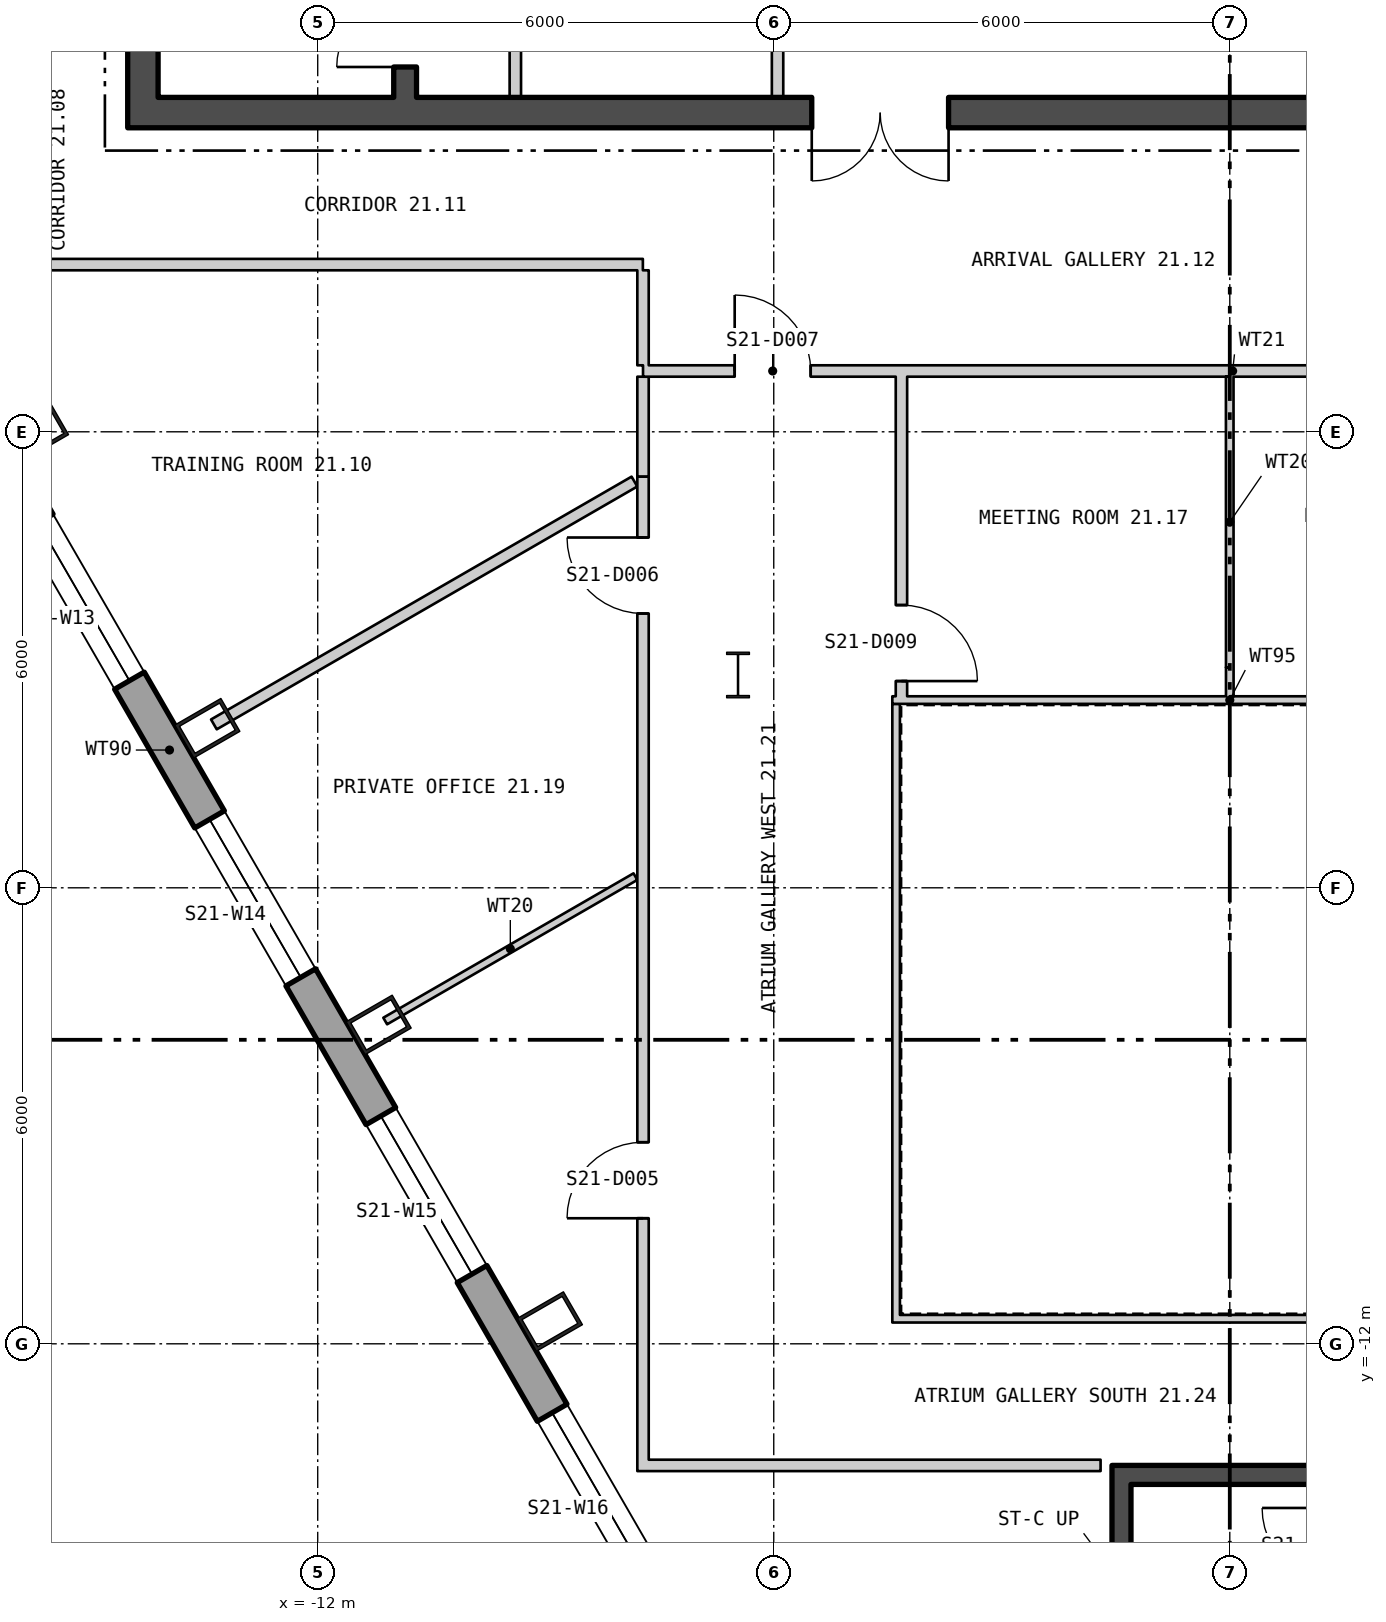
"""IFC4 building model, lengths in metres.
Left out: names, types, materials, properties, quantities, classifications, styles, units other than length and angle.
Written with IfcOpenShell. Run it as: python <this file> out.ifc"""

import sys

from ifc_helpers import new_model, si_unit, direction, frame, frame_2d, origin, origin_2d, place, context, subcontext, project, spatial, polyline, rectangle, hollow_rectangle, i_section, outline, extrude, element, fill, save


model = new_model("IFC4")
c1 = context("Model", 3, precision=1e-05, world=origin(), true_north=direction((0.0, 1.0)))
c2 = subcontext(c1, "Body", "Model", "MODEL_VIEW")
j1 = project(units=[si_unit("LENGTHUNIT", "METRE"), si_unit("PLANEANGLEUNIT", "RADIAN")], contexts=[c1])
p1 = place(None, origin())
s1 = spatial("IfcSite", under=j1, at=p1, CompositionType="ELEMENT")
p2 = place(p1, origin())
s2 = spatial("IfcBuilding", under=s1, at=p2, CompositionType="ELEMENT")
p3 = place(p2, frame((0.0, 0.0, 280.5)))
s3 = spatial("IfcBuildingStorey", under=s2, at=p3, CompositionType="ELEMENT", Elevation=280.5)
for number, where, z_axis, x_axis in (
    (1, (-15.706, 0.004, 0.0), (0.0, 0.0, 1.0), (0.5, -0.866, 0.0)),
    (2, (-13.452, -3.9, 0.0), (0.0, 0.0, 1.0), (0.5, -0.866, 0.0)),
    (3, (-11.198, -7.804, 0.0), (0.0, 0.0, 1.0), (0.5, -0.866, 0.0)),
    (4, (-8.945, -11.707, 0.0), (0.0, 0.0, 1.0), (0.5, -0.866, 0.0)),
):
    element("IfcColumn", number, at=place(p3, frame(where, z_axis=z_axis, x_axis=x_axis)), inside=s3, PredefinedType="COLUMN", context=c2, shape_type="SweptSolid", body=[
        extrude(hollow_rectangle(XDim=0.5, YDim=0.7, WallThickness=0.045, at=origin_2d()), origin(), (0.0, 0.0, 1.0), 3.9),
    ])
p4 = place(p3, frame((-6.47, -3.2, 0.0), z_axis=(0.0, 0.0, 1.0), x_axis=(1.0, 0.0, 0.0)))
e5 = element("IfcColumn", 5, at=p4, inside=s3, PredefinedType="COLUMN", context=c2, shape_type="SweptSolid", body=[
    extrude(i_section(OverallWidth=0.3, OverallDepth=0.6, WebThickness=0.015, FlangeThickness=0.03, at=origin_2d()), origin(), (0.0, 0.0, 1.0), 3.9),
])
p5 = place(p3, frame((-25.385, 15.619, -0.18), z_axis=(0.0, 0.0, 1.0), x_axis=(0.500000711659, -0.866024992908, 0.0)))
e6 = element("IfcWall", 6, at=p5, inside=s3, PredefinedType="SOLIDWALL", context=c2, shape_type="SweptSolid", body=[
    extrude(outline(polyline([(-0.13, -0.225), (45.87, -0.225), (45.61, 0.225), (0.13, 0.225), (-0.13, -0.225)])), origin(), (0.0, 0.0, 1.0), 3.68),
])
p6 = place(p5, frame((1.424, 0.0, 1.08)))
e7 = element("IfcOpeningElement", 7, at=p6, cuts=e6, PredefinedType="OPENING", context=c2, shape_type="SweptSolid", body=[
    extrude(rectangle(XDim=2.4, YDim=2.0, at=frame_2d((1.2, 1.0))), frame((0.0, 0.235, 0.0), z_axis=(0.0, -1.0, 0.0), x_axis=(1.0, 0.0, 0.0)), (0.0, 0.0, 1.0), 0.47),
])
p7 = place(p5, frame((5.893, 0.0, 1.08)))
e8 = element("IfcOpeningElement", 8, at=p7, cuts=e6, PredefinedType="OPENING", context=c2, shape_type="SweptSolid", body=[
    extrude(rectangle(XDim=2.4, YDim=2.0, at=frame_2d((1.2, 1.0))), frame((0.0, 0.235, 0.0), z_axis=(0.0, -1.0, 0.0), x_axis=(1.0, 0.0, 0.0)), (0.0, 0.0, 1.0), 0.47),
])
p8 = place(p5, frame((10.401, 0.0, 1.08)))
e9 = element("IfcOpeningElement", 9, at=p8, cuts=e6, PredefinedType="OPENING", context=c2, shape_type="SweptSolid", body=[
    extrude(rectangle(XDim=2.4, YDim=2.0, at=frame_2d((1.2, 1.0))), frame((0.0, 0.235, 0.0), z_axis=(0.0, -1.0, 0.0), x_axis=(1.0, 0.0, 0.0)), (0.0, 0.0, 1.0), 0.47),
])
p9 = place(p5, frame((14.909, 0.0, 1.08)))
e10 = element("IfcOpeningElement", 10, at=p9, cuts=e6, PredefinedType="OPENING", context=c2, shape_type="SweptSolid", body=[
    extrude(rectangle(XDim=2.4, YDim=2.0, at=frame_2d((1.2, 1.0))), frame((0.0, 0.235, 0.0), z_axis=(0.0, -1.0, 0.0), x_axis=(1.0, 0.0, 0.0)), (0.0, 0.0, 1.0), 0.47),
])
p10 = place(p5, frame((19.416, 0.0, 1.08)))
e11 = element("IfcOpeningElement", 11, at=p10, cuts=e6, PredefinedType="OPENING", context=c2, shape_type="SweptSolid", body=[
    extrude(rectangle(XDim=2.4, YDim=2.0, at=frame_2d((1.2, 1.0))), frame((0.0, 0.235, 0.0), z_axis=(0.0, -1.0, 0.0), x_axis=(1.0, 0.0, 0.0)), (0.0, 0.0, 1.0), 0.47),
])
p11 = place(p5, frame((23.924, 0.0, 1.08)))
e12 = element("IfcOpeningElement", 12, at=p11, cuts=e6, PredefinedType="OPENING", context=c2, shape_type="SweptSolid", body=[
    extrude(rectangle(XDim=2.4, YDim=2.0, at=frame_2d((1.2, 1.0))), frame((0.0, 0.235, 0.0), z_axis=(0.0, -1.0, 0.0), x_axis=(1.0, 0.0, 0.0)), (0.0, 0.0, 1.0), 0.47),
])
p12 = place(p5, frame((28.431, 0.0, 1.08)))
e13 = element("IfcOpeningElement", 13, at=p12, cuts=e6, PredefinedType="OPENING", context=c2, shape_type="SweptSolid", body=[
    extrude(rectangle(XDim=2.4, YDim=2.0, at=frame_2d((1.2, 1.0))), frame((0.0, 0.235, 0.0), z_axis=(0.0, -1.0, 0.0), x_axis=(1.0, 0.0, 0.0)), (0.0, 0.0, 1.0), 0.47),
])
p13 = place(p5, frame((32.939, 0.0, 1.08)))
e14 = element("IfcOpeningElement", 14, at=p13, cuts=e6, PredefinedType="OPENING", context=c2, shape_type="SweptSolid", body=[
    extrude(rectangle(XDim=2.4, YDim=2.0, at=frame_2d((1.2, 1.0))), frame((0.0, 0.235, 0.0), z_axis=(0.0, -1.0, 0.0), x_axis=(1.0, 0.0, 0.0)), (0.0, 0.0, 1.0), 0.47),
])
p14 = place(p5, frame((37.447, 0.0, 1.08)))
e15 = element("IfcOpeningElement", 15, at=p14, cuts=e6, PredefinedType="OPENING", context=c2, shape_type="SweptSolid", body=[
    extrude(rectangle(XDim=2.4, YDim=2.0, at=frame_2d((1.2, 1.0))), frame((0.0, 0.235, 0.0), z_axis=(0.0, -1.0, 0.0), x_axis=(1.0, 0.0, 0.0)), (0.0, 0.0, 1.0), 0.47),
])
p15 = place(p5, frame((41.916, 0.0, 1.08)))
e16 = element("IfcOpeningElement", 16, at=p15, cuts=e6, PredefinedType="OPENING", context=c2, shape_type="SweptSolid", body=[
    extrude(rectangle(XDim=2.4, YDim=2.0, at=frame_2d((1.2, 1.0))), frame((0.0, 0.235, 0.0), z_axis=(0.0, -1.0, 0.0), x_axis=(1.0, 0.0, 0.0)), (0.0, 0.0, 1.0), 0.47),
])
for number, where, z_axis, x_axis in (
    (17, (-4.44, -11.67, 0.0), (0.0, 0.0, 1.0), (1.0, 0.0, 0.0)),
    (18, (4.44, -3.53, 0.0), (0.0, 0.0, 1.0), (-1.0, 0.0, 0.0)),
):
    element("IfcWall", number, at=place(p3, frame(where, z_axis=z_axis, x_axis=x_axis)), inside=s3, PredefinedType="PARTITIONING", context=c2, shape_type="SweptSolid", body=[
        extrude(rectangle(XDim=8.88, YDim=0.1, at=frame_2d((4.44, 0.0))), origin(), (0.0, 0.0, 1.0), 3.7),
    ])
p16 = place(p3, frame((-4.39, -3.58, 0.0), z_axis=(0.0, 0.0, 1.0), x_axis=(0.0, -1.0, 0.0)))
e19 = element("IfcWall", 19, at=p16, inside=s3, PredefinedType="PARTITIONING", context=c2, shape_type="SweptSolid", body=[
    extrude(rectangle(XDim=8.04, YDim=0.1, at=frame_2d((4.02, 0.0))), origin(), (0.0, 0.0, 1.0), 3.7),
])
p17 = place(p3, frame((-14.5, 4.2, 0.0), z_axis=(0.0, 0.0, 1.0), x_axis=(1.0, 0.0, 0.0)))
e20 = element("IfcWall", 20, at=p17, inside=s3, PredefinedType="SHEAR", context=c2, shape_type="SweptSolid", body=[
    extrude(rectangle(XDim=29.0, YDim=0.4, at=frame_2d((14.5, 0.0))), origin(), (0.0, 0.0, 1.0), 3.7),
])
p18 = place(p17, frame((9.0, 0.0, 0.0)))
e21 = element("IfcOpeningElement", 21, at=p18, cuts=e20, PredefinedType="OPENING", context=c2, shape_type="SweptSolid", body=[
    extrude(rectangle(XDim=1.8, YDim=2.4, at=frame_2d((0.9, 1.2))), frame((0.0, 0.21, 0.0), z_axis=(0.0, -1.0, 0.0), x_axis=(1.0, 0.0, 0.0)), (0.0, 0.0, 1.0), 0.42),
])
p19 = place(p17, frame((19.0, 0.0, 0.0)))
e22 = element("IfcOpeningElement", 22, at=p19, cuts=e20, PredefinedType="OPENING", context=c2, shape_type="SweptSolid", body=[
    extrude(rectangle(XDim=1.8, YDim=2.4, at=frame_2d((0.9, 1.2))), frame((0.0, 0.21, 0.0), z_axis=(0.0, -1.0, 0.0), x_axis=(1.0, 0.0, 0.0)), (0.0, 0.0, 1.0), 0.42),
])
p20 = place(p3, frame((-14.3, 4.4, 0.0), z_axis=(0.0, 0.0, 1.0), x_axis=(0.0, 1.0, 0.0)))
e23 = element("IfcWall", 23, at=p20, inside=s3, PredefinedType="SHEAR", context=c2, shape_type="SweptSolid", body=[
    extrude(rectangle(XDim=13.2, YDim=0.4, at=frame_2d((6.6, 0.0))), origin(), (0.0, 0.0, 1.0), 3.7),
])
p21 = place(p20, frame((3.05, 0.0, 0.0)))
e24 = element("IfcOpeningElement", 24, at=p21, cuts=e23, PredefinedType="OPENING", context=c2, shape_type="SweptSolid", body=[
    extrude(rectangle(XDim=1.5, YDim=2.1, at=frame_2d((0.75, 1.05))), frame((0.0, 0.21, 0.0), z_axis=(0.0, -1.0, 0.0), x_axis=(1.0, 0.0, 0.0)), (0.0, 0.0, 1.0), 0.42),
])
p22 = place(p3, frame((-10.85, 4.4, 0.0), z_axis=(0.0, 0.0, 1.0), x_axis=(0.0, 1.0, 0.0)))
e25 = element("IfcWall", 25, at=p22, inside=s3, PredefinedType="SHEAR", context=c2, shape_type="SweptSolid", body=[
    extrude(rectangle(XDim=13.2, YDim=0.3, at=frame_2d((6.6, 0.0))), origin(), (0.0, 0.0, 1.0), 3.7),
])
p23 = place(p22, frame((1.575, 0.0, 0.0)))
e26 = element("IfcOpeningElement", 26, at=p23, cuts=e25, PredefinedType="OPENING", context=c2, shape_type="SweptSolid", body=[
    extrude(rectangle(XDim=1.25, YDim=2.1, at=frame_2d((0.625, 1.05))), frame((0.0, 0.16, 0.0), z_axis=(0.0, -1.0, 0.0), x_axis=(1.0, 0.0, 0.0)), (0.0, 0.0, 1.0), 0.32),
])
p24 = place(p22, frame((0.4, 0.0, 0.0)))
e27 = element("IfcOpeningElement", 27, at=p24, cuts=e25, PredefinedType="OPENING", context=c2, shape_type="SweptSolid", body=[
    extrude(rectangle(XDim=0.9, YDim=2.1, at=frame_2d((0.45, 1.05))), frame((0.0, 0.16, 0.0), z_axis=(0.0, -1.0, 0.0), x_axis=(1.0, 0.0, 0.0)), (0.0, 0.0, 1.0), 0.32),
])
for number, where, z_axis, x_axis in (
    (28, (-9.4, 4.4, 0.0), (0.0, 0.0, 1.0), (0.0, 1.0, 0.0)),
    (29, (-5.95, 4.4, 0.0), (0.0, 0.0, 1.0), (0.0, 1.0, 0.0)),
):
    element("IfcWall", number, at=place(p3, frame(where, z_axis=z_axis, x_axis=x_axis)), inside=s3, PredefinedType="PARTITIONING", context=c2, shape_type="SweptSolid", body=[
        extrude(rectangle(XDim=1.895, YDim=0.15, at=frame_2d((0.948, 0.0))), origin(), (0.0, 0.0, 1.0), 3.7),
    ])
p25 = place(p3, frame((-1.425, -21.05, 0.0), z_axis=(0.0, 0.0, 1.0), x_axis=(0.0, 1.0, 0.0)))
e30 = element("IfcWall", 30, at=p25, inside=s3, PredefinedType="SHEAR", context=c2, shape_type="SweptSolid", body=[
    extrude(rectangle(XDim=7.2, YDim=0.25, at=frame_2d((3.6, 0.0))), origin(), (0.0, 0.0, 1.0), 3.7),
])
p26 = place(p3, frame((-1.55, -13.725, 0.0), z_axis=(0.0, 0.0, 1.0), x_axis=(1.0, 0.0, 0.0)))
e31 = element("IfcWall", 31, at=p26, inside=s3, PredefinedType="SHEAR", context=c2, shape_type="SweptSolid", body=[
    extrude(rectangle(XDim=3.1, YDim=0.25, at=frame_2d((1.55, 0.0))), origin(), (0.0, 0.0, 1.0), 3.7),
])
p27 = place(p3, frame((-16.225, 2.2, 0.0), z_axis=(0.0, 0.0, 1.0), x_axis=(1.0, 0.0, 0.0)))
e32 = element("IfcWall", 32, at=p27, inside=s3, PredefinedType="PARTITIONING", context=c2, shape_type="SweptSolid", body=[
    extrude(rectangle(XDim=8.503, YDim=0.15, at=frame_2d((4.252, 0.0))), origin(), (0.0, 0.0, 1.0), 3.7),
])
p28 = place(p3, frame((-13.366, -3.85, 0.0), z_axis=(0.0, 0.0, 1.0), x_axis=(0.865990094875, 0.500061151839, 0.0)))
e33 = element("IfcWall", 33, at=p28, inside=s3, PredefinedType="PARTITIONING", context=c2, shape_type="SweptSolid", body=[
    extrude(rectangle(XDim=6.389, YDim=0.15, at=frame_2d((3.195, 0.0))), origin(), (0.0, 0.0, 1.0), 3.7),
])
p29 = place(p3, frame((-11.112, -7.753, 0.0), z_axis=(0.0, 0.0, 1.0), x_axis=(0.86609797283, 0.499874285655, 0.0)))
e34 = element("IfcWall", 34, at=p29, inside=s3, PredefinedType="PARTITIONING", context=c2, shape_type="SweptSolid", body=[
    extrude(rectangle(XDim=3.801, YDim=0.1, at=frame_2d((1.901, 0.0))), origin(), (0.0, 0.0, 1.0), 3.7),
])
p30 = place(p3, frame((-7.72, -13.675, 0.0), z_axis=(0.0, 0.0, 1.0), x_axis=(0.0, 1.0, 0.0)))
e35 = element("IfcWall", 35, at=p30, inside=s3, PredefinedType="PARTITIONING", context=c2, shape_type="SweptSolid", body=[
    extrude(rectangle(XDim=13.085, YDim=0.15, at=frame_2d((6.543, 0.0))), origin(), (0.0, 0.0, 1.0), 3.7),
])
p31 = place(p30, frame((3.327, 0.0, 0.0)))
e36 = element("IfcOpeningElement", 36, at=p31, cuts=e35, PredefinedType="OPENING", context=c2, shape_type="SweptSolid", body=[
    extrude(rectangle(XDim=1.0, YDim=2.1, at=frame_2d((0.5, 1.05))), frame((0.0, 0.085, 0.0), z_axis=(0.0, -1.0, 0.0), x_axis=(1.0, 0.0, 0.0)), (0.0, 0.0, 1.0), 0.17),
])
p32 = place(p30, frame((11.284, 0.0, 0.0)))
e37 = element("IfcOpeningElement", 37, at=p32, cuts=e35, PredefinedType="OPENING", context=c2, shape_type="SweptSolid", body=[
    extrude(rectangle(XDim=1.0, YDim=2.1, at=frame_2d((0.5, 1.05))), frame((0.0, 0.085, 0.0), z_axis=(0.0, -1.0, 0.0), x_axis=(1.0, 0.0, 0.0)), (0.0, 0.0, 1.0), 0.17),
])
p33 = place(p3, frame((-7.72, -0.588, 0.0), z_axis=(0.0, 0.0, 1.0), x_axis=(0.0, 1.0, 0.0)))
e38 = element("IfcWall", 38, at=p33, inside=s3, PredefinedType="PARTITIONING", context=c2, shape_type="SweptSolid", body=[
    extrude(rectangle(XDim=1.313, YDim=0.15, at=frame_2d((0.656, 0.0))), origin(), (0.0, 0.0, 1.0), 3.7),
])
p34 = place(p3, frame((-7.72, 0.8, 0.0), z_axis=(0.0, 0.0, 1.0), x_axis=(1.0, 0.0, 0.0)))
e39 = element("IfcWall", 39, at=p34, inside=s3, PredefinedType="PARTITIONING", context=c2, shape_type="SweptSolid", body=[
    extrude(rectangle(XDim=15.515, YDim=0.15, at=frame_2d((7.758, 0.0))), origin(), (0.0, 0.0, 1.0), 3.7),
])
p35 = place(p34, frame((1.206, 0.0, 0.0)))
e40 = element("IfcOpeningElement", 40, at=p35, cuts=e39, PredefinedType="OPENING", context=c2, shape_type="SweptSolid", body=[
    extrude(rectangle(XDim=1.0, YDim=2.1, at=frame_2d((0.5, 1.05))), frame((0.0, 0.085, 0.0), z_axis=(0.0, -1.0, 0.0), x_axis=(1.0, 0.0, 0.0)), (0.0, 0.0, 1.0), 0.17),
])
p36 = place(p34, frame((13.234, 0.0, 0.0)))
e41 = element("IfcOpeningElement", 41, at=p36, cuts=e39, PredefinedType="OPENING", context=c2, shape_type="SweptSolid", body=[
    extrude(rectangle(XDim=1.0, YDim=2.1, at=frame_2d((0.5, 1.05))), frame((0.0, 0.085, 0.0), z_axis=(0.0, -1.0, 0.0), x_axis=(1.0, 0.0, 0.0)), (0.0, 0.0, 1.0), 0.17),
])
p37 = place(p3, frame((-7.72, 0.875, 0.0), z_axis=(0.0, 0.0, 1.0), x_axis=(0.0, 1.0, 0.0)))
e42 = element("IfcWall", 42, at=p37, inside=s3, PredefinedType="PARTITIONING", context=c2, shape_type="SweptSolid", body=[
    extrude(rectangle(XDim=1.25, YDim=0.15, at=frame_2d((0.625, 0.0))), origin(), (0.0, 0.0, 1.0), 3.7),
])
p38 = place(p3, frame((-7.645, -13.6, 0.0), z_axis=(0.0, 0.0, 1.0), x_axis=(1.0, 0.0, 0.0)))
e43 = element("IfcWall", 43, at=p38, inside=s3, PredefinedType="PARTITIONING", context=c2, shape_type="SweptSolid", body=[
    extrude(rectangle(XDim=5.945, YDim=0.15, at=frame_2d((2.973, 0.0))), origin(), (0.0, 0.0, 1.0), 2.79),
])
p39 = place(p3, frame((-4.32, -3.48, 0.0), z_axis=(0.0, 0.0, 1.0), x_axis=(0.0, 1.0, 0.0)))
e44 = element("IfcWall", 44, at=p39, inside=s3, PredefinedType="PARTITIONING", context=c2, shape_type="SweptSolid", body=[
    extrude(rectangle(XDim=4.205, YDim=0.15, at=frame_2d((2.103, 0.0))), origin(), (0.0, 0.0, 1.0), 3.7),
])
p40 = place(p39, frame((0.2, 0.0, 0.0)))
e45 = element("IfcOpeningElement", 45, at=p40, cuts=e44, PredefinedType="OPENING", context=c2, shape_type="SweptSolid", body=[
    extrude(rectangle(XDim=1.0, YDim=2.1, at=frame_2d((0.5, 1.05))), frame((0.0, 0.085, 0.0), z_axis=(0.0, -1.0, 0.0), x_axis=(1.0, 0.0, 0.0)), (0.0, 0.0, 1.0), 0.17),
])
p41 = place(p3, frame((-0.001, 0.725, 0.0), z_axis=(0.0, 0.0, 1.0), x_axis=(0.000235294111, -0.999999972318, 0.0)))
e46 = element("IfcWall", 46, at=p41, inside=s3, PredefinedType="PARTITIONING", context=c2, shape_type="SweptSolid", body=[
    extrude(rectangle(XDim=3.825, YDim=0.1, at=frame_2d((1.913, 0.0))), origin(), (0.0, 0.0, 1.0), 3.2),
])
p42 = place(p3, frame((-0.0, -3.1, 0.0), z_axis=(0.0, 0.0, 1.0), x_axis=(0.000263157886, -0.999999965374, 0.0)))
e47 = element("IfcWall", 47, at=p42, inside=s3, PredefinedType="PARTITIONING", context=c2, shape_type="SweptSolid", body=[
    extrude(rectangle(XDim=0.38, YDim=0.1, at=frame_2d((0.19, 0.0))), origin(), (0.0, 0.0, 1.0), 3.7),
])
p43 = place(p10, origin())
e48 = element("IfcWindow", 48, at=p43, inside=s3, PartitioningType="SINGLE_PANEL", PredefinedType="WINDOW", context=c2, shape_type="SweptSolid", body=[
    extrude(rectangle(XDim=2.4, YDim=2.0, at=frame_2d((1.2, 1.0))), frame((0.0, 0.105, 0.0), z_axis=(0.0, -1.0, 0.0), x_axis=(1.0, 0.0, 0.0)), (0.0, 0.0, 1.0), 0.06),
])
fill(e11, e48)
p44 = place(p11, origin())
e49 = element("IfcWindow", 49, at=p44, inside=s3, PartitioningType="SINGLE_PANEL", PredefinedType="WINDOW", context=c2, shape_type="SweptSolid", body=[
    extrude(rectangle(XDim=2.4, YDim=2.0, at=frame_2d((1.2, 1.0))), frame((0.0, 0.105, 0.0), z_axis=(0.0, -1.0, 0.0), x_axis=(1.0, 0.0, 0.0)), (0.0, 0.0, 1.0), 0.06),
])
fill(e12, e49)
p45 = place(p12, origin())
e50 = element("IfcWindow", 50, at=p45, inside=s3, PartitioningType="SINGLE_PANEL", PredefinedType="WINDOW", context=c2, shape_type="SweptSolid", body=[
    extrude(rectangle(XDim=2.4, YDim=2.0, at=frame_2d((1.2, 1.0))), frame((0.0, 0.105, 0.0), z_axis=(0.0, -1.0, 0.0), x_axis=(1.0, 0.0, 0.0)), (0.0, 0.0, 1.0), 0.06),
])
fill(e13, e50)
p46 = place(p13, origin())
e51 = element("IfcWindow", 51, at=p46, inside=s3, PartitioningType="SINGLE_PANEL", PredefinedType="WINDOW", context=c2, shape_type="SweptSolid", body=[
    extrude(rectangle(XDim=2.4, YDim=2.0, at=frame_2d((1.2, 1.0))), frame((0.0, 0.105, 0.0), z_axis=(0.0, -1.0, 0.0), x_axis=(1.0, 0.0, 0.0)), (0.0, 0.0, 1.0), 0.06),
])
fill(e14, e51)
p47 = place(p24, origin())
e52 = element("IfcDoor", 52, at=p47, inside=s3, OperationType="SINGLE_SWING_RIGHT", PredefinedType="DOOR", context=c2, shape_type="SweptSolid", body=[
    extrude(rectangle(XDim=0.9, YDim=2.1, at=frame_2d((0.45, 1.05))), frame((0.0, 0.025, 0.0), z_axis=(0.0, -1.0, 0.0), x_axis=(1.0, 0.0, 0.0)), (0.0, 0.0, 1.0), 0.05),
])
fill(e27, e52)
p48 = place(p18, origin())
e53 = element("IfcDoor", 53, at=p48, inside=s3, OperationType="DOUBLE_DOOR_SINGLE_SWING", PredefinedType="DOOR", context=c2, shape_type="SweptSolid", body=[
    extrude(rectangle(XDim=1.8, YDim=2.4, at=frame_2d((0.9, 1.2))), frame((0.0, 0.025, 0.0), z_axis=(0.0, -1.0, 0.0), x_axis=(1.0, 0.0, 0.0)), (0.0, 0.0, 1.0), 0.05),
])
fill(e21, e53)
p49 = place(p31, origin())
e54 = element("IfcDoor", 54, at=p49, inside=s3, OperationType="SINGLE_SWING_RIGHT", PredefinedType="DOOR", context=c2, shape_type="SweptSolid", body=[
    extrude(rectangle(XDim=1.0, YDim=2.1, at=frame_2d((0.5, 1.05))), frame((0.0, 0.025, 0.0), z_axis=(0.0, -1.0, 0.0), x_axis=(1.0, 0.0, 0.0)), (0.0, 0.0, 1.0), 0.05),
])
fill(e36, e54)
p50 = place(p32, origin())
e55 = element("IfcDoor", 55, at=p50, inside=s3, OperationType="SINGLE_SWING_LEFT", PredefinedType="DOOR", context=c2, shape_type="SweptSolid", body=[
    extrude(rectangle(XDim=1.0, YDim=2.1, at=frame_2d((0.5, 1.05))), frame((0.0, 0.025, 0.0), z_axis=(0.0, -1.0, 0.0), x_axis=(1.0, 0.0, 0.0)), (0.0, 0.0, 1.0), 0.05),
])
fill(e37, e55)
p51 = place(p35, origin())
e56 = element("IfcDoor", 56, at=p51, inside=s3, OperationType="SINGLE_SWING_RIGHT", PredefinedType="DOOR", context=c2, shape_type="SweptSolid", body=[
    extrude(rectangle(XDim=1.0, YDim=2.1, at=frame_2d((0.5, 1.05))), frame((0.0, 0.025, 0.0), z_axis=(0.0, -1.0, 0.0), x_axis=(1.0, 0.0, 0.0)), (0.0, 0.0, 1.0), 0.05),
])
fill(e40, e56)
p52 = place(p40, origin())
e57 = element("IfcDoor", 57, at=p52, inside=s3, OperationType="SINGLE_SWING_LEFT", PredefinedType="DOOR", context=c2, shape_type="SweptSolid", body=[
    extrude(rectangle(XDim=1.0, YDim=2.1, at=frame_2d((0.5, 1.05))), frame((0.0, 0.025, 0.0), z_axis=(0.0, -1.0, 0.0), x_axis=(1.0, 0.0, 0.0)), (0.0, 0.0, 1.0), 0.05),
])
fill(e45, e57)
save(model, sys.argv[1])
